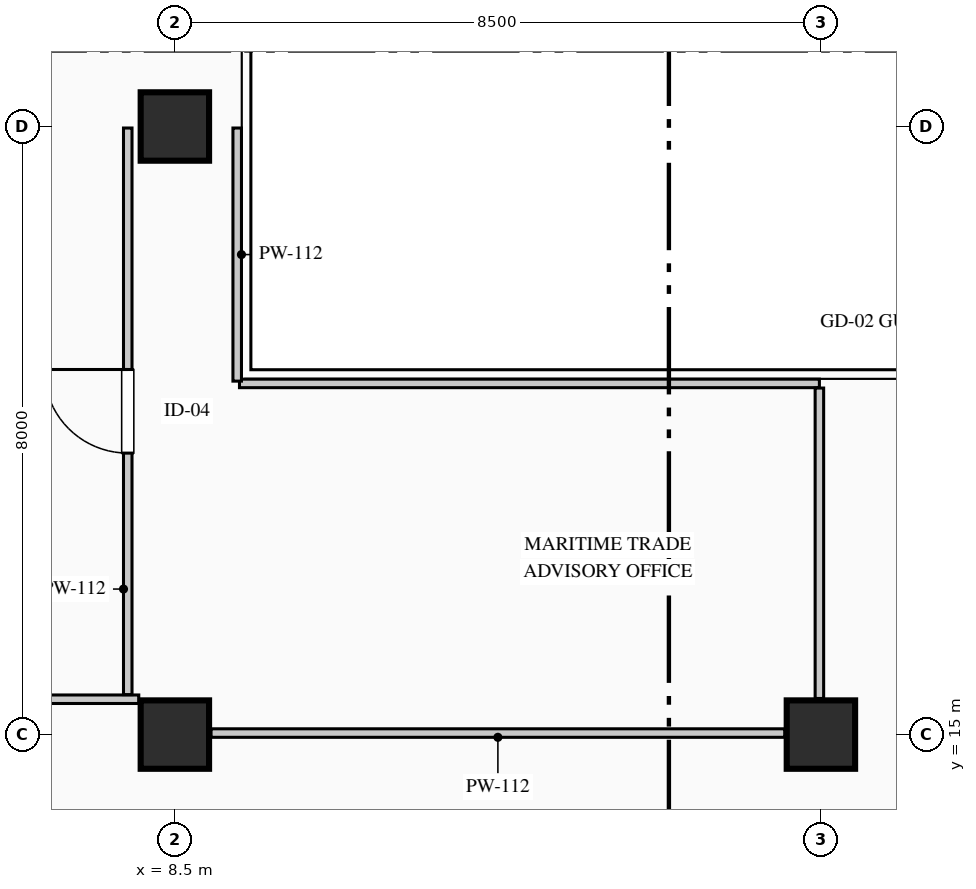
"""IFC4 building model, lengths in metres.
Left out: names, types, materials, properties, quantities, classifications, styles, units other than length and angle.
Written with IfcOpenShell. Run it as: python <this file> out.ifc"""

import sys

from ifc_helpers import new_model, si_unit, direction, frame, frame_2d, origin, origin_2d, place, context, subcontext, project, spatial, rectangle, extrude, element, fill, save


model = new_model("IFC4")
c1 = context("Model", 3, precision=1e-05, world=origin(), true_north=direction((0.0, 1.0)))
c2 = subcontext(c1, "Body", "Model", "MODEL_VIEW")
j1 = project(units=[si_unit("LENGTHUNIT", "METRE"), si_unit("PLANEANGLEUNIT", "RADIAN")], contexts=[c1])
p1 = place(None, origin())
s1 = spatial("IfcSite", under=j1, at=p1, CompositionType="ELEMENT")
p2 = place(p1, origin())
s2 = spatial("IfcBuilding", under=s1, at=p2, CompositionType="ELEMENT")
p3 = place(p2, frame((0.0, 0.0, 183.75)))
s3 = spatial("IfcBuildingStorey", under=s2, at=p3, CompositionType="ELEMENT", Elevation=183.75)
for number, where, z_axis, x_axis in (
    (1, (8.5, 15.0, 0.0), (0.0, 0.0, 1.0), (1.0, 0.0, 0.0)),
    (2, (8.5, 23.0, 0.0), (0.0, 0.0, 1.0), (1.0, 0.0, 0.0)),
    (3, (17.0, 15.0, 0.0), (0.0, 0.0, 1.0), (1.0, 0.0, 0.0)),
):
    element("IfcColumn", number, at=place(p3, frame(where, z_axis=z_axis, x_axis=x_axis)), inside=s3, PredefinedType="COLUMN", context=c2, shape_type="SweptSolid", body=[
        extrude(rectangle(XDim=0.9, YDim=0.9, at=origin_2d()), origin(), (0.0, 0.0, 1.0), 3.95),
    ])
p4 = place(p3, frame((7.469, 4.63, 0.0), z_axis=(0.0, 0.0, 1.0), x_axis=(-0.123515300309, 0.992342667928, 0.0)))
e4 = element("IfcWall", 4, at=p4, inside=s3, PredefinedType="STANDARD", context=c2, shape_type="SweptSolid", body=[
    extrude(rectangle(XDim=37.024, YDim=0.26, at=frame_2d((18.512, 0.0))), origin(), (0.0, 0.0, 1.0), 3.7),
])
p5 = place(p4, frame((11.978, 0.0, 0.9)))
e5 = element("IfcOpeningElement", 5, at=p5, cuts=e4, PredefinedType="OPENING", context=c2, shape_type="SweptSolid", body=[
    extrude(rectangle(XDim=2.7, YDim=2.1, at=frame_2d((1.35, 1.05))), frame((0.0, 0.14, 0.0), z_axis=(0.0, -1.0, 0.0), x_axis=(1.0, 0.0, 0.0)), (0.0, 0.0, 1.0), 0.28),
])
p6 = place(p3, frame((9.35, 19.62, 0.0), z_axis=(0.0, 0.0, 1.0), x_axis=(1.0, 0.0, 0.0)))
e6 = element("IfcWall", 6, at=p6, inside=s3, PredefinedType="PARTITIONING", context=c2, shape_type="SweptSolid", body=[
    extrude(rectangle(XDim=7.63, YDim=0.112, at=frame_2d((3.815, 0.0))), origin(), (0.0, 0.0, 1.0), 3.7),
])
p7 = place(p3, frame((16.98, 19.559, 0.0), z_axis=(0.0, 0.0, 1.0), x_axis=(0.0, -1.0, 0.0)))
e7 = element("IfcWall", 7, at=p7, inside=s3, PredefinedType="PARTITIONING", context=c2, shape_type="SweptSolid", body=[
    extrude(rectangle(XDim=4.084, YDim=0.112, at=frame_2d((2.042, 0.0))), origin(), (0.0, 0.0, 1.0), 3.7),
])
p8 = place(p3, frame((16.525, 15.02, 0.0), z_axis=(0.0, 0.0, 1.0), x_axis=(-1.0, 0.0, 0.0)))
e8 = element("IfcWall", 8, at=p8, inside=s3, PredefinedType="PARTITIONING", context=c2, shape_type="SweptSolid", body=[
    extrude(rectangle(XDim=7.55, YDim=0.112, at=frame_2d((3.775, 0.0))), origin(), (0.0, 0.0, 1.0), 3.085),
])
p9 = place(p3, frame((8.025, 15.465, 0.0), z_axis=(0.0, 0.0, 1.0), x_axis=(-1.0, 0.0, 0.0)))
e9 = element("IfcWall", 9, at=p9, inside=s3, PredefinedType="PARTITIONING", context=c2, shape_type="SweptSolid", body=[
    extrude(rectangle(XDim=1.769, YDim=0.112, at=frame_2d((0.884, 0.0))), origin(), (0.0, 0.0, 1.0), 3.7),
])
p10 = place(p3, frame((7.88, 15.526, 0.0), z_axis=(0.0, 0.0, 1.0), x_axis=(0.0, 1.0, 0.0)))
e10 = element("IfcWall", 10, at=p10, inside=s3, PredefinedType="PARTITIONING", context=c2, shape_type="SweptSolid", body=[
    extrude(rectangle(XDim=7.454, YDim=0.112, at=frame_2d((3.727, 0.0))), origin(), (0.0, 0.0, 1.0), 3.7),
])
p11 = place(p10, frame((3.177, 0.0, 0.0)))
e11 = element("IfcOpeningElement", 11, at=p11, cuts=e10, PredefinedType="OPENING", context=c2, shape_type="SweptSolid", body=[
    extrude(rectangle(XDim=1.1, YDim=2.2, at=frame_2d((0.55, 1.1))), frame((0.0, 0.066, 0.0), z_axis=(0.0, -1.0, 0.0), x_axis=(1.0, 0.0, 0.0)), (0.0, 0.0, 1.0), 0.132),
])
p12 = place(p3, frame((9.32, 22.98, 0.0), z_axis=(0.0, 0.0, 1.0), x_axis=(0.0, -1.0, 0.0)))
e12 = element("IfcWall", 12, at=p12, inside=s3, PredefinedType="PARTITIONING", context=c2, shape_type="SweptSolid", body=[
    extrude(rectangle(XDim=3.33, YDim=0.112, at=frame_2d((1.665, 0.0))), origin(), (0.0, 0.0, 1.0), 3.385),
])
p13 = place(p11, origin())
e13 = element("IfcDoor", 13, at=p13, inside=s3, OperationType="SINGLE_SWING_RIGHT", PredefinedType="DOOR", context=c2, shape_type="SweptSolid", body=[
    extrude(rectangle(XDim=1.1, YDim=2.2, at=frame_2d((0.55, 1.1))), frame((0.0, 0.025, 0.0), z_axis=(0.0, -1.0, 0.0), x_axis=(1.0, 0.0, 0.0)), (0.0, 0.0, 1.0), 0.05),
])
fill(e11, e13)
save(model, sys.argv[1])
